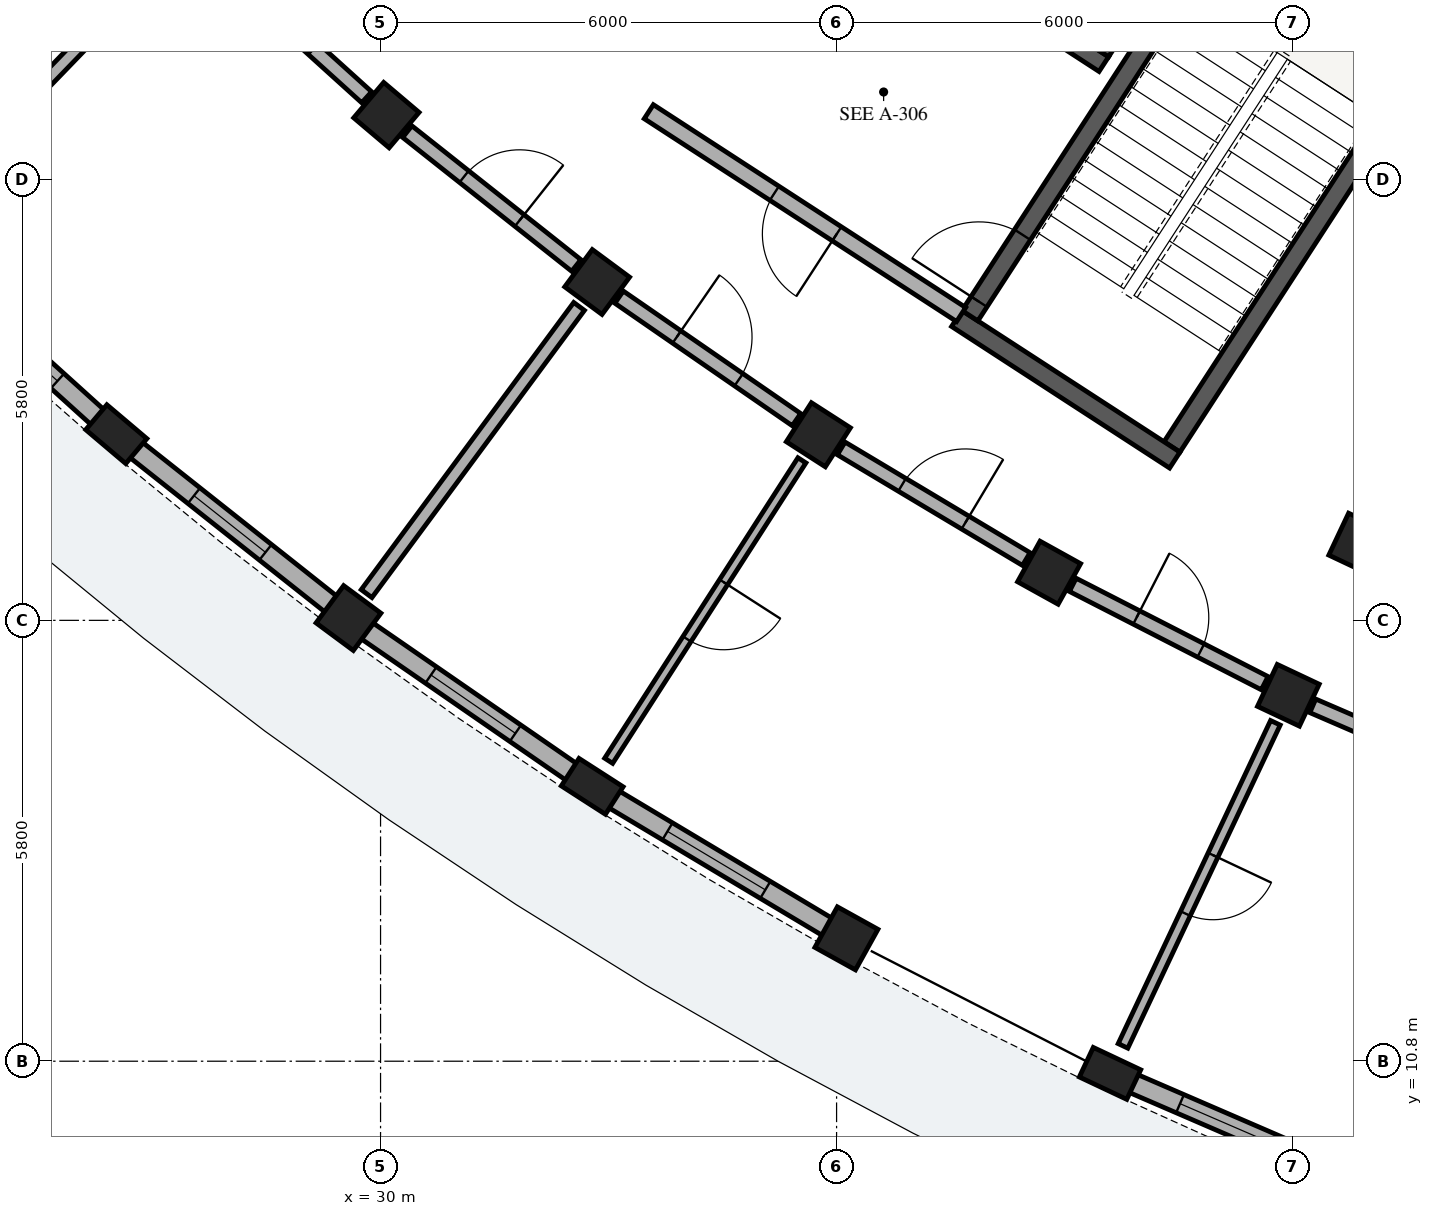
"""IFC4 building model, lengths in metres.
Left out: names, types, materials, properties, quantities, classifications, styles, units other than length and angle.
Written with IfcOpenShell. Run it as: python <this file> out.ifc"""

import sys

from ifc_helpers import new_model, si_unit, direction, frame, frame_2d, origin, origin_2d, place, context, subcontext, project, spatial, rectangle, extrude, element, fill, save


model = new_model("IFC4")
c1 = context("Model", 3, precision=1e-05, world=origin(), true_north=direction((0.0, 1.0)))
c2 = subcontext(c1, "Body", "Model", "MODEL_VIEW")
j1 = project(units=[si_unit("LENGTHUNIT", "METRE"), si_unit("PLANEANGLEUNIT", "RADIAN")], contexts=[c1])
p1 = place(None, origin())
s1 = spatial("IfcSite", under=j1, at=p1, CompositionType="ELEMENT")
p2 = place(p1, origin())
s2 = spatial("IfcBuilding", under=s1, at=p2, CompositionType="ELEMENT")
p3 = place(p2, origin())
s3 = spatial("IfcBuildingStorey", under=s2, at=p3, CompositionType="ELEMENT", Elevation=0.0)
p4 = place(p3, frame((40.413, 18.882, 0.0), z_axis=(0.0, 0.0, 1.0), x_axis=(0.544629435258, 0.838676802022, 0.0)))
e1 = element("IfcWall", 1, at=p4, inside=s3, PredefinedType="SHEAR", context=c2, shape_type="SweptSolid", body=[
    extrude(rectangle(XDim=6.6, YDim=0.25, at=frame_2d((3.3, 0.0))), origin(), (0.0, 0.0, 1.0), 4.48),
])
p5 = place(p3, frame((40.449, 18.709, 0.0), z_axis=(0.0, 0.0, 1.0), x_axis=(-0.838678407117, 0.544626963559, 0.0)))
e2 = element("IfcWall", 2, at=p5, inside=s3, PredefinedType="SHEAR", context=c2, shape_type="SweptSolid", body=[
    extrude(rectangle(XDim=3.42, YDim=0.25, at=frame_2d((1.71, 0.0))), origin(), (0.0, 0.0, 1.0), 4.48),
])
p6 = place(p3, frame((37.754, 20.608, 0.0), z_axis=(0.0, 0.0, 1.0), x_axis=(0.544655453679, 0.838659905312, 0.0)))
e3 = element("IfcWall", 3, at=p6, inside=s3, PredefinedType="SHEAR", context=c2, shape_type="SweptSolid", body=[
    extrude(rectangle(XDim=6.6, YDim=0.25, at=frame_2d((3.3, 0.0))), origin(), (0.0, 0.0, 1.0), 4.48),
])
p7 = place(p6, frame((0.22, 0.0, 0.0)))
e4 = element("IfcOpeningElement", 4, at=p7, cuts=e3, PredefinedType="OPENING", context=c2, shape_type="SweptSolid", body=[
    extrude(rectangle(XDim=1.05, YDim=2.15, at=frame_2d((0.525, 1.075))), frame((0.0, 0.135, 0.0), z_axis=(0.0, -1.0, 0.0), x_axis=(1.0, 0.0, 0.0)), (0.0, 0.0, 1.0), 0.27),
])
p8 = place(p3, frame((39.516, 23.917, 0.0), z_axis=(0.0, 0.0, 1.0), x_axis=(-0.838660840752, 0.544654013286, 0.0)))
e5 = element("IfcWall", 5, at=p8, inside=s3, PredefinedType="SHEAR", context=c2, shape_type="SweptSolid", body=[
    extrude(rectangle(XDim=3.26, YDim=0.23, at=frame_2d((1.63, 0.0))), origin(), (0.0, 0.0, 1.0), 4.48),
])
p9 = place(p8, frame((0.9, 0.0, 0.0)))
e6 = element("IfcOpeningElement", 6, at=p9, cuts=e5, PredefinedType="OPENING", context=c2, shape_type="SweptSolid", body=[
    extrude(rectangle(XDim=1.0, YDim=2.15, at=frame_2d((0.5, 1.075))), frame((0.0, 0.125, 0.0), z_axis=(0.0, -1.0, 0.0), x_axis=(1.0, 0.0, 0.0)), (0.0, 0.0, 1.0), 0.25),
])
p10 = place(p3, frame((39.482, 24.077, 0.0), z_axis=(0.0, 0.0, 1.0), x_axis=(0.544686387605, 0.838639814913, 0.0)))
e7 = element("IfcWall", 7, at=p10, inside=s3, PredefinedType="SHEAR", context=c2, shape_type="SweptSolid", body=[
    extrude(rectangle(XDim=2.7, YDim=0.23, at=frame_2d((1.35, 0.0))), origin(), (0.0, 0.0, 1.0), 4.48),
])
p11 = place(p3, frame((30.077, 23.247, 0.0), z_axis=(0.0, 0.0, 1.0), x_axis=(-0.646123979643, -0.763232469783, 0.0)))
e8 = element("IfcColumn", 8, at=p11, inside=s3, PredefinedType="COLUMN", context=c2, shape_type="SweptSolid", body=[
    extrude(rectangle(XDim=0.61, YDim=0.61, at=origin_2d()), origin(), (0.0, 0.0, 1.0), 4.485),
])
p12 = place(p3, frame((26.523, 19.05, 0.0), z_axis=(0.0, 0.0, 1.0), x_axis=(-0.646123979643, -0.763232469783, 0.0)))
e9 = element("IfcColumn", 9, at=p12, inside=s3, PredefinedType="PILASTER", context=c2, shape_type="SweptSolid", body=[
    extrude(rectangle(XDim=0.43, YDim=0.69, at=origin_2d()), origin(), (0.0, 0.0, 1.0), 4.485),
])
for number, where, z_axis, x_axis in (
    (10, (32.85, 21.052, 0.0), (0.0, 0.0, 1.0), (-0.595, -0.804, 0.0)),
    (11, (29.578, 16.63, 0.0), (0.0, 0.0, 1.0), (-0.595, -0.804, 0.0)),
    (12, (35.76, 19.042, 0.0), (0.0, 0.0, 1.0), (-0.541, -0.841, 0.0)),
):
    element("IfcColumn", number, at=place(p3, frame(where, z_axis=z_axis, x_axis=x_axis)), inside=s3, PredefinedType="COLUMN", context=c2, shape_type="SweptSolid", body=[
        extrude(rectangle(XDim=0.61, YDim=0.61, at=origin_2d()), origin(), (0.0, 0.0, 1.0), 4.485),
    ])
p13 = place(p3, frame((32.785, 14.416, 0.0), z_axis=(0.0, 0.0, 1.0), x_axis=(-0.540974471368, -0.841039012964, 0.0)))
e13 = element("IfcColumn", 13, at=p13, inside=s3, PredefinedType="PILASTER", context=c2, shape_type="SweptSolid", body=[
    extrude(rectangle(XDim=0.43, YDim=0.69, at=origin_2d()), origin(), (0.0, 0.0, 1.0), 4.485),
])
for number, where, z_axis, x_axis in (
    (14, (38.796, 17.227, 0.0), (0.0, 0.0, 1.0), (-0.485, -0.875, 0.0)),
    (15, (36.13, 12.417, 0.0), (0.0, 0.0, 1.0), (-0.485, -0.875, 0.0)),
    (16, (42.882, 17.604, 0.0), (0.0, 0.0, 1.0), (-0.427, -0.904, 0.0)),
    (17, (41.944, 15.614, 0.0), (0.0, 0.0, 1.0), (-0.427, -0.904, 0.0)),
):
    element("IfcColumn", number, at=place(p3, frame(where, z_axis=z_axis, x_axis=x_axis)), inside=s3, PredefinedType="COLUMN", context=c2, shape_type="SweptSolid", body=[
        extrude(rectangle(XDim=0.61, YDim=0.61, at=origin_2d()), origin(), (0.0, 0.0, 1.0), 4.485),
    ])
p14 = place(p3, frame((39.598, 10.64, 0.0), z_axis=(0.0, 0.0, 1.0), x_axis=(-0.426568739901, -0.904455145454, 0.0)))
e18 = element("IfcColumn", 18, at=p14, inside=s3, PredefinedType="PILASTER", context=c2, shape_type="SweptSolid", body=[
    extrude(rectangle(XDim=0.43, YDim=0.69, at=origin_2d()), origin(), (0.0, 0.0, 1.0), 4.485),
])
p15 = place(p3, frame((23.837, 21.479, 0.0), z_axis=(0.0, 0.0, 1.0), x_axis=(0.741699000924, -0.670732876806, 0.0)))
e19 = element("IfcWall", 19, at=p15, inside=s3, PredefinedType="SOLIDWALL", context=c2, shape_type="SweptSolid", body=[
    extrude(rectangle(XDim=3.437, YDim=0.26, at=frame_2d((1.718, 0.0))), origin(), (0.0, 0.0, 1.0), 3.755),
])
p16 = place(p15, frame((0.858, 0.0, 0.55)))
e20 = element("IfcOpeningElement", 20, at=p16, cuts=e19, PredefinedType="OPENING", context=c2, shape_type="SweptSolid", body=[
    extrude(rectangle(XDim=1.72, YDim=1.61, at=frame_2d((0.86, 0.805))), frame((0.0, 0.14, 0.0), z_axis=(0.0, -1.0, 0.0), x_axis=(1.0, 0.0, 0.0)), (0.0, 0.0, 1.0), 0.28),
])
p17 = place(p3, frame((26.668, 18.935, 0.0), z_axis=(0.0, 0.0, 1.0), x_axis=(0.783970914649, -0.620797555556, 0.0)))
e21 = element("IfcWall", 21, at=p17, inside=s3, PredefinedType="SOLIDWALL", context=c2, shape_type="SweptSolid", body=[
    extrude(rectangle(XDim=3.437, YDim=0.26, at=frame_2d((1.718, 0.0))), origin(), (0.0, 0.0, 1.0), 3.755),
])
p18 = place(p17, frame((1.118, 0.0, 0.55)))
e22 = element("IfcOpeningElement", 22, at=p18, cuts=e21, PredefinedType="OPENING", context=c2, shape_type="SweptSolid", body=[
    extrude(rectangle(XDim=1.2, YDim=1.55, at=frame_2d((0.6, 0.775))), frame((0.0, 0.14, 0.0), z_axis=(0.0, -1.0, 0.0), x_axis=(1.0, 0.0, 0.0)), (0.0, 0.0, 1.0), 0.28),
])
p19 = place(p3, frame((29.805, 16.474, 0.0), z_axis=(0.0, 0.0, 1.0), x_axis=(0.822879502564, -0.568215913416, 0.0)))
e23 = element("IfcWall", 23, at=p19, inside=s3, PredefinedType="SOLIDWALL", context=c2, shape_type="SweptSolid", body=[
    extrude(rectangle(XDim=3.437, YDim=0.26, at=frame_2d((1.718, 0.0))), origin(), (0.0, 0.0, 1.0), 3.755),
])
p20 = place(p19, frame((1.043, 0.0, 0.55)))
e24 = element("IfcOpeningElement", 24, at=p20, cuts=e23, PredefinedType="OPENING", context=c2, shape_type="SweptSolid", body=[
    extrude(rectangle(XDim=1.35, YDim=1.65, at=frame_2d((0.675, 0.825))), frame((0.0, 0.14, 0.0), z_axis=(0.0, -1.0, 0.0), x_axis=(1.0, 0.0, 0.0)), (0.0, 0.0, 1.0), 0.28),
])
p21 = place(p3, frame((32.944, 14.321, 0.0), z_axis=(0.0, 0.0, 1.0), x_axis=(0.858281691366, -0.51317885602, 0.0)))
e25 = element("IfcWall", 25, at=p21, inside=s3, PredefinedType="SOLIDWALL", context=c2, shape_type="SweptSolid", body=[
    extrude(rectangle(XDim=3.437, YDim=0.26, at=frame_2d((1.718, 0.0))), origin(), (0.0, 0.0, 1.0), 3.755),
])
p22 = place(p21, frame((0.969, 0.0, 0.55)))
e26 = element("IfcOpeningElement", 26, at=p22, cuts=e25, PredefinedType="OPENING", context=c2, shape_type="SweptSolid", body=[
    extrude(rectangle(XDim=1.5, YDim=1.7, at=frame_2d((0.75, 0.85))), frame((0.0, 0.14, 0.0), z_axis=(0.0, -1.0, 0.0), x_axis=(1.0, 0.0, 0.0)), (0.0, 0.0, 1.0), 0.28),
])
p23 = place(p3, frame((39.768, 10.566, 0.0), z_axis=(0.0, 0.0, 1.0), x_axis=(0.917905988043, -0.396797929826, 0.0)))
e27 = element("IfcWall", 27, at=p23, inside=s3, PredefinedType="SOLIDWALL", context=c2, shape_type="SweptSolid", body=[
    extrude(rectangle(XDim=3.437, YDim=0.26, at=frame_2d((1.719, 0.0))), origin(), (0.0, 0.0, 1.0), 3.755),
])
p24 = place(p23, frame((0.818, 0.0, 0.55)))
e28 = element("IfcOpeningElement", 28, at=p24, cuts=e27, PredefinedType="OPENING", context=c2, shape_type="SweptSolid", body=[
    extrude(rectangle(XDim=1.8, YDim=1.85, at=frame_2d((0.9, 0.925))), frame((0.0, 0.14, 0.0), z_axis=(0.0, -1.0, 0.0), x_axis=(1.0, 0.0, 0.0)), (0.0, 0.0, 1.0), 0.28),
])
p25 = place(p3, frame((37.639, 20.623, 0.0), z_axis=(0.0, 0.0, 1.0), x_axis=(-0.838681446513, 0.544622283124, 0.0)))
e29 = element("IfcWall", 29, at=p25, inside=s3, PredefinedType="PARTITIONING", context=c2, shape_type="SweptSolid", body=[
    extrude(rectangle(XDim=4.9, YDim=0.22, at=frame_2d((2.45, 0.0))), origin(), (0.0, 0.0, 1.0), 3.74),
])
p26 = place(p25, frame((1.95, 0.0, 0.0)))
e30 = element("IfcOpeningElement", 30, at=p26, cuts=e29, PredefinedType="OPENING", context=c2, shape_type="SweptSolid", body=[
    extrude(rectangle(XDim=0.98, YDim=2.14, at=frame_2d((0.49, 1.07))), frame((0.0, 0.12, 0.0), z_axis=(0.0, -1.0, 0.0), x_axis=(1.0, 0.0, 0.0)), (0.0, 0.0, 1.0), 0.24),
])
p27 = place(p3, frame((27.176, 25.332, 0.0), z_axis=(0.0, 0.0, 1.0), x_axis=(-0.69466218314, -0.719336118456, 0.0)))
e31 = element("IfcWall", 31, at=p27, inside=s3, PredefinedType="PARTITIONING", context=c2, shape_type="SweptSolid", body=[
    extrude(rectangle(XDim=4.7, YDim=0.175, at=frame_2d((2.35, 0.0))), origin(), (0.0, 0.0, 1.0), 3.1),
])
p28 = place(p3, frame((27.713, 25.385, 0.0), z_axis=(0.0, 0.0, 1.0), x_axis=(0.741631592147, -0.670807410163, 0.0)))
e32 = element("IfcWall", 32, at=p28, inside=s3, PredefinedType="PARTITIONING", context=c2, shape_type="SweptSolid", body=[
    extrude(rectangle(XDim=2.837, YDim=0.195, at=frame_2d((1.418, 0.0))), origin(), (0.0, 0.0, 1.0), 3.1),
])
p29 = place(p28, frame((0.944, 0.0, 0.0)))
e33 = element("IfcOpeningElement", 33, at=p29, cuts=e32, PredefinedType="OPENING", context=c2, shape_type="SweptSolid", body=[
    extrude(rectangle(XDim=0.95, YDim=2.13, at=frame_2d((0.475, 1.065))), frame((0.0, 0.107, 0.0), z_axis=(0.0, -1.0, 0.0), x_axis=(1.0, 0.0, 0.0)), (0.0, 0.0, 1.0), 0.215),
])
p30 = place(p3, frame((30.351, 23.03, 0.0), z_axis=(0.0, 0.0, 1.0), x_axis=(0.783965548427, -0.620804332201, 0.0)))
e34 = element("IfcWall", 34, at=p30, inside=s3, PredefinedType="PARTITIONING", context=c2, shape_type="SweptSolid", body=[
    extrude(rectangle(XDim=2.837, YDim=0.195, at=frame_2d((1.418, 0.0))), origin(), (0.0, 0.0, 1.0), 3.1),
])
p31 = place(p30, frame((0.954, 0.0, 0.0)))
e35 = element("IfcOpeningElement", 35, at=p31, cuts=e34, PredefinedType="OPENING", context=c2, shape_type="SweptSolid", body=[
    extrude(rectangle(XDim=0.93, YDim=2.12, at=frame_2d((0.465, 1.06))), frame((0.0, 0.107, 0.0), z_axis=(0.0, -1.0, 0.0), x_axis=(1.0, 0.0, 0.0)), (0.0, 0.0, 1.0), 0.215),
])
p32 = place(p3, frame((32.612, 20.73, 0.0), z_axis=(0.0, 0.0, 1.0), x_axis=(-0.59482622273, -0.803854318116, 0.0)))
e36 = element("IfcWall", 36, at=p32, inside=s3, PredefinedType="PARTITIONING", context=c2, shape_type="SweptSolid", body=[
    extrude(rectangle(XDim=4.7, YDim=0.175, at=frame_2d((2.35, 0.0))), origin(), (0.0, 0.0, 1.0), 3.1),
])
p33 = place(p3, frame((33.138, 20.853, 0.0), z_axis=(0.0, 0.0, 1.0), x_axis=(0.822870075235, -0.568229565653, 0.0)))
e37 = element("IfcWall", 37, at=p33, inside=s3, PredefinedType="PARTITIONING", context=c2, shape_type="SweptSolid", body=[
    extrude(rectangle(XDim=2.837, YDim=0.195, at=frame_2d((1.418, 0.0))), origin(), (0.0, 0.0, 1.0), 3.1),
])
p34 = place(p33, frame((0.924, 0.0, 0.0)))
e38 = element("IfcOpeningElement", 38, at=p34, cuts=e37, PredefinedType="OPENING", context=c2, shape_type="SweptSolid", body=[
    extrude(rectangle(XDim=0.99, YDim=2.16, at=frame_2d((0.495, 1.08))), frame((0.0, 0.107, 0.0), z_axis=(0.0, -1.0, 0.0), x_axis=(1.0, 0.0, 0.0)), (0.0, 0.0, 1.0), 0.215),
])
p35 = place(p3, frame((35.544, 18.705, 0.0), z_axis=(0.0, 0.0, 1.0), x_axis=(-0.540959731567, -0.84104849374, 0.0)))
e39 = element("IfcWall", 39, at=p35, inside=s3, PredefinedType="PARTITIONING", context=c2, shape_type="SweptSolid", body=[
    extrude(rectangle(XDim=4.7, YDim=0.125, at=frame_2d((2.35, 0.0))), origin(), (0.0, 0.0, 1.0), 3.1),
])
p36 = place(p35, frame((1.905, 0.0, 0.0)))
e40 = element("IfcOpeningElement", 40, at=p36, cuts=e39, PredefinedType="OPENING", context=c2, shape_type="SweptSolid", body=[
    extrude(rectangle(XDim=0.89, YDim=2.1, at=frame_2d((0.445, 1.05))), frame((0.0, 0.073, 0.0), z_axis=(0.0, -1.0, 0.0), x_axis=(1.0, 0.0, 0.0)), (0.0, 0.0, 1.0), 0.145),
])
p37 = place(p3, frame((36.061, 18.862, 0.0), z_axis=(0.0, 0.0, 1.0), x_axis=(0.858281647443, -0.51317892948, 0.0)))
e41 = element("IfcWall", 41, at=p37, inside=s3, PredefinedType="PARTITIONING", context=c2, shape_type="SweptSolid", body=[
    extrude(rectangle(XDim=2.837, YDim=0.195, at=frame_2d((1.418, 0.0))), origin(), (0.0, 0.0, 1.0), 3.1),
])
p38 = place(p37, frame((0.934, 0.0, 0.0)))
e42 = element("IfcOpeningElement", 42, at=p38, cuts=e41, PredefinedType="OPENING", context=c2, shape_type="SweptSolid", body=[
    extrude(rectangle(XDim=0.97, YDim=2.15, at=frame_2d((0.485, 1.075))), frame((0.0, 0.107, 0.0), z_axis=(0.0, -1.0, 0.0), x_axis=(1.0, 0.0, 0.0)), (0.0, 0.0, 1.0), 0.215),
])
p39 = place(p3, frame((39.107, 17.067, 0.0), z_axis=(0.0, 0.0, 1.0), x_axis=(0.890030590607, -0.45590080915, 0.0)))
e43 = element("IfcWall", 43, at=p39, inside=s3, PredefinedType="PARTITIONING", context=c2, shape_type="SweptSolid", body=[
    extrude(rectangle(XDim=2.837, YDim=0.195, at=frame_2d((1.418, 0.0))), origin(), (0.0, 0.0, 1.0), 3.1),
])
p40 = place(p39, frame((0.944, 0.0, 0.0)))
e44 = element("IfcOpeningElement", 44, at=p40, cuts=e43, PredefinedType="OPENING", context=c2, shape_type="SweptSolid", body=[
    extrude(rectangle(XDim=0.95, YDim=2.13, at=frame_2d((0.475, 1.065))), frame((0.0, 0.107, 0.0), z_axis=(0.0, -1.0, 0.0), x_axis=(1.0, 0.0, 0.0)), (0.0, 0.0, 1.0), 0.215),
])
p41 = place(p3, frame((41.773, 15.252, 0.0), z_axis=(0.0, 0.0, 1.0), x_axis=(-0.426567365945, -0.904455793453, 0.0)))
e45 = element("IfcWall", 45, at=p41, inside=s3, PredefinedType="PLUMBINGWALL", context=c2, shape_type="SweptSolid", body=[
    extrude(rectangle(XDim=4.7, YDim=0.14, at=frame_2d((2.35, 0.0))), origin(), (0.0, 0.0, 1.0), 3.1),
])
p42 = place(p41, frame((1.925, 0.0, 0.0)))
e46 = element("IfcOpeningElement", 46, at=p42, cuts=e45, PredefinedType="OPENING", context=c2, shape_type="SweptSolid", body=[
    extrude(rectangle(XDim=0.85, YDim=2.05, at=frame_2d((0.425, 1.025))), frame((0.0, 0.08, 0.0), z_axis=(0.0, -1.0, 0.0), x_axis=(1.0, 0.0, 0.0)), (0.0, 0.0, 1.0), 0.16),
])
p43 = place(p3, frame((42.265, 15.475, 0.0), z_axis=(0.0, 0.0, 1.0), x_axis=(0.917943439406, -0.396711282991, 0.0)))
e47 = element("IfcWall", 47, at=p43, inside=s3, PredefinedType="PARTITIONING", context=c2, shape_type="SweptSolid", body=[
    extrude(rectangle(XDim=2.837, YDim=0.195, at=frame_2d((1.418, 0.0))), origin(), (0.0, 0.0, 1.0), 3.1),
])
p44 = place(p43, frame((0.954, 0.0, 0.0)))
e48 = element("IfcOpeningElement", 48, at=p44, cuts=e47, PredefinedType="OPENING", context=c2, shape_type="SweptSolid", body=[
    extrude(rectangle(XDim=0.93, YDim=2.12, at=frame_2d((0.465, 1.06))), frame((0.0, 0.107, 0.0), z_axis=(0.0, -1.0, 0.0), x_axis=(1.0, 0.0, 0.0)), (0.0, 0.0, 1.0), 0.215),
])
p45 = place(p16, origin())
e49 = element("IfcWindow", 49, at=p45, inside=s3, PartitioningType="SINGLE_PANEL", PredefinedType="WINDOW", context=c2, shape_type="SweptSolid", body=[
    extrude(rectangle(XDim=1.72, YDim=1.61, at=frame_2d((0.86, 0.805))), frame((0.0, 0.03, 0.0), z_axis=(0.0, -1.0, 0.0), x_axis=(1.0, 0.0, 0.0)), (0.0, 0.0, 1.0), 0.06),
])
fill(e20, e49)
p46 = place(p18, origin())
e50 = element("IfcWindow", 50, at=p46, inside=s3, PartitioningType="SINGLE_PANEL", PredefinedType="WINDOW", context=c2, shape_type="SweptSolid", body=[
    extrude(rectangle(XDim=1.2, YDim=1.55, at=frame_2d((0.6, 0.775))), frame((0.0, 0.03, 0.0), z_axis=(0.0, -1.0, 0.0), x_axis=(1.0, 0.0, 0.0)), (0.0, 0.0, 1.0), 0.06),
])
fill(e22, e50)
p47 = place(p20, origin())
e51 = element("IfcWindow", 51, at=p47, inside=s3, PartitioningType="SINGLE_PANEL", PredefinedType="WINDOW", context=c2, shape_type="SweptSolid", body=[
    extrude(rectangle(XDim=1.35, YDim=1.65, at=frame_2d((0.675, 0.825))), frame((0.0, 0.03, 0.0), z_axis=(0.0, -1.0, 0.0), x_axis=(1.0, 0.0, 0.0)), (0.0, 0.0, 1.0), 0.06),
])
fill(e24, e51)
p48 = place(p22, origin())
e52 = element("IfcWindow", 52, at=p48, inside=s3, PartitioningType="SINGLE_PANEL", PredefinedType="WINDOW", context=c2, shape_type="SweptSolid", body=[
    extrude(rectangle(XDim=1.5, YDim=1.7, at=frame_2d((0.75, 0.85))), frame((0.0, 0.03, 0.0), z_axis=(0.0, -1.0, 0.0), x_axis=(1.0, 0.0, 0.0)), (0.0, 0.0, 1.0), 0.06),
])
fill(e26, e52)
p49 = place(p24, origin())
e53 = element("IfcWindow", 53, at=p49, inside=s3, PartitioningType="SINGLE_PANEL", PredefinedType="WINDOW", context=c2, shape_type="SweptSolid", body=[
    extrude(rectangle(XDim=1.8, YDim=1.85, at=frame_2d((0.9, 0.925))), frame((0.0, 0.03, 0.0), z_axis=(0.0, -1.0, 0.0), x_axis=(1.0, 0.0, 0.0)), (0.0, 0.0, 1.0), 0.06),
])
fill(e28, e53)
p50 = place(p7, origin())
e54 = element("IfcDoor", 54, at=p50, inside=s3, OperationType="SINGLE_SWING_LEFT", PredefinedType="DOOR", context=c2, shape_type="SweptSolid", body=[
    extrude(rectangle(XDim=1.05, YDim=2.15, at=frame_2d((0.525, 1.075))), frame((0.0, 0.025, 0.0), z_axis=(0.0, -1.0, 0.0), x_axis=(1.0, 0.0, 0.0)), (0.0, 0.0, 1.0), 0.05),
])
fill(e4, e54)
p51 = place(p26, origin())
e55 = element("IfcDoor", 55, at=p51, inside=s3, OperationType="SINGLE_SWING_LEFT", PredefinedType="DOOR", context=c2, shape_type="SweptSolid", body=[
    extrude(rectangle(XDim=0.98, YDim=2.14, at=frame_2d((0.49, 1.07))), frame((0.0, 0.025, 0.0), z_axis=(0.0, -1.0, 0.0), x_axis=(1.0, 0.0, 0.0)), (0.0, 0.0, 1.0), 0.05),
])
fill(e30, e55)
p52 = place(p31, origin())
e56 = element("IfcDoor", 56, at=p52, inside=s3, OperationType="SINGLE_SWING_RIGHT", PredefinedType="DOOR", context=c2, shape_type="SweptSolid", body=[
    extrude(rectangle(XDim=0.93, YDim=2.12, at=frame_2d((0.465, 1.06))), frame((0.0, 0.025, 0.0), z_axis=(0.0, -1.0, 0.0), x_axis=(1.0, 0.0, 0.0)), (0.0, 0.0, 1.0), 0.05),
])
fill(e35, e56)
p53 = place(p34, origin())
e57 = element("IfcDoor", 57, at=p53, inside=s3, OperationType="SINGLE_SWING_LEFT", PredefinedType="DOOR", context=c2, shape_type="SweptSolid", body=[
    extrude(rectangle(XDim=0.99, YDim=2.16, at=frame_2d((0.495, 1.08))), frame((0.0, 0.025, 0.0), z_axis=(0.0, -1.0, 0.0), x_axis=(1.0, 0.0, 0.0)), (0.0, 0.0, 1.0), 0.05),
])
fill(e38, e57)
p54 = place(p36, origin())
e58 = element("IfcDoor", 58, at=p54, inside=s3, OperationType="SINGLE_SWING_LEFT", PredefinedType="DOOR", context=c2, shape_type="SweptSolid", body=[
    extrude(rectangle(XDim=0.89, YDim=2.1, at=frame_2d((0.445, 1.05))), frame((0.0, 0.025, 0.0), z_axis=(0.0, -1.0, 0.0), x_axis=(1.0, 0.0, 0.0)), (0.0, 0.0, 1.0), 0.05),
])
fill(e40, e58)
p55 = place(p38, origin())
e59 = element("IfcDoor", 59, at=p55, inside=s3, OperationType="SINGLE_SWING_RIGHT", PredefinedType="DOOR", context=c2, shape_type="SweptSolid", body=[
    extrude(rectangle(XDim=0.97, YDim=2.15, at=frame_2d((0.485, 1.075))), frame((0.0, 0.025, 0.0), z_axis=(0.0, -1.0, 0.0), x_axis=(1.0, 0.0, 0.0)), (0.0, 0.0, 1.0), 0.05),
])
fill(e42, e59)
p56 = place(p40, origin())
e60 = element("IfcDoor", 60, at=p56, inside=s3, OperationType="SINGLE_SWING_LEFT", PredefinedType="DOOR", context=c2, shape_type="SweptSolid", body=[
    extrude(rectangle(XDim=0.95, YDim=2.13, at=frame_2d((0.475, 1.065))), frame((0.0, 0.025, 0.0), z_axis=(0.0, -1.0, 0.0), x_axis=(1.0, 0.0, 0.0)), (0.0, 0.0, 1.0), 0.05),
])
fill(e44, e60)
p57 = place(p42, origin())
e61 = element("IfcDoor", 61, at=p57, inside=s3, OperationType="SINGLE_SWING_LEFT", PredefinedType="DOOR", context=c2, shape_type="SweptSolid", body=[
    extrude(rectangle(XDim=0.85, YDim=2.05, at=frame_2d((0.425, 1.025))), frame((0.0, 0.025, 0.0), z_axis=(0.0, -1.0, 0.0), x_axis=(1.0, 0.0, 0.0)), (0.0, 0.0, 1.0), 0.05),
])
fill(e46, e61)
save(model, sys.argv[1])
